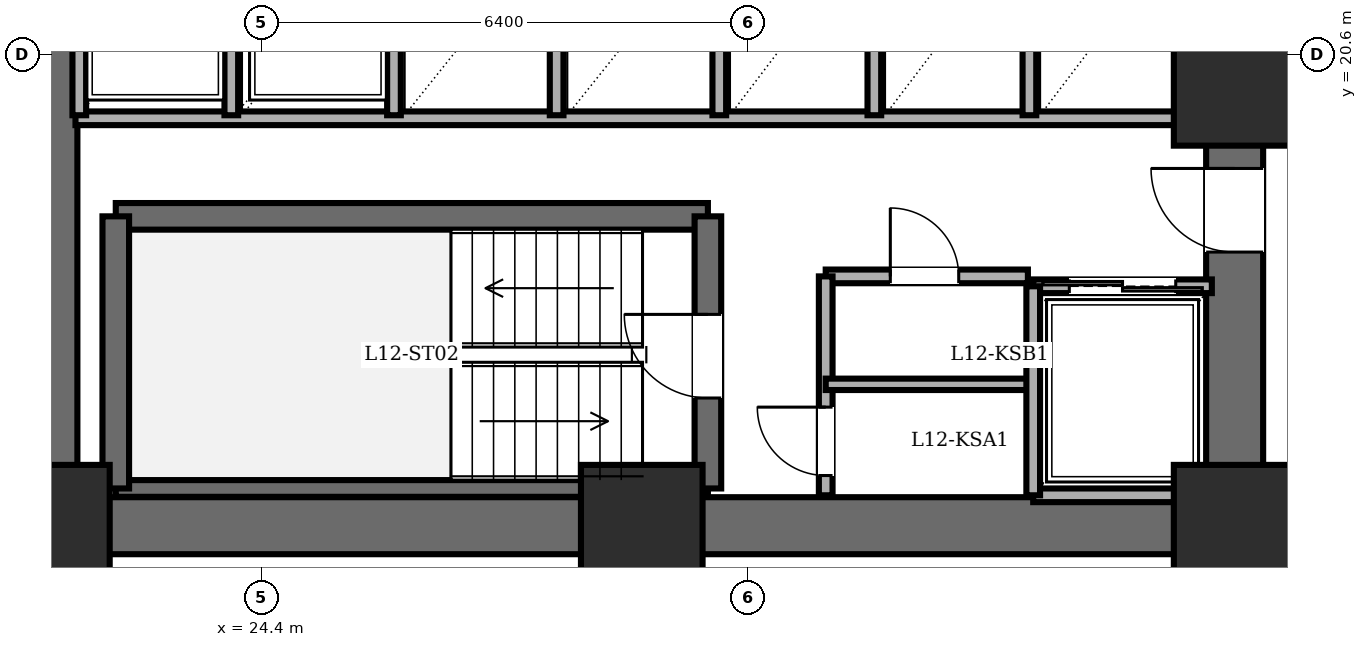
"""IFC4 building model, lengths in metres.
Left out: names, types, materials, properties, quantities, classifications, styles, units other than length and angle.
Written with IfcOpenShell. Run it as: python <this file> out.ifc"""

import sys

from ifc_helpers import new_model, si_unit, direction, frame, frame_2d, origin, origin_2d, place, context, subcontext, project, spatial, rectangle, extrude, element, fill, save


model = new_model("IFC4")
c1 = context("Model", 3, precision=1e-05, world=origin(), true_north=direction((0.0, 1.0)))
c2 = subcontext(c1, "Body", "Model", "MODEL_VIEW")
j1 = project(units=[si_unit("LENGTHUNIT", "METRE"), si_unit("PLANEANGLEUNIT", "RADIAN")], contexts=[c1])
p1 = place(None, origin())
s1 = spatial("IfcSite", under=j1, at=p1, CompositionType="ELEMENT")
p2 = place(p1, origin())
s2 = spatial("IfcBuilding", under=s1, at=p2, CompositionType="ELEMENT")
p3 = place(p2, frame((0.0, 0.0, 46.8)))
s3 = spatial("IfcBuildingStorey", under=s2, at=p3, CompositionType="ELEMENT", Elevation=46.8)
for number, where, z_axis, x_axis in (
    (1, (21.6, 14.4, 0.0), (0.0, 0.0, 1.0), (1.0, 0.0, 0.0)),
    (2, (29.4, 14.4, 0.0), (0.0, 0.0, 1.0), (1.0, 0.0, 0.0)),
    (3, (37.2, 14.4, 0.0), (0.0, 0.0, 1.0), (1.0, 0.0, 0.0)),
    (4, (37.2, 20.2, 0.0), (0.0, 0.0, 1.0), (1.0, 0.0, 0.0)),
):
    element("IfcColumn", number, at=place(p3, frame(where, z_axis=z_axis, x_axis=x_axis)), inside=s3, PredefinedType="COLUMN", context=c2, shape_type="SweptSolid", body=[
        extrude(rectangle(XDim=1.6, YDim=1.6, at=origin_2d()), origin(), (0.0, 0.0, 1.0), 3.6),
    ])
p4 = place(p3, frame((21.6, 14.4, 0.0), z_axis=(0.0, 0.0, 1.0), x_axis=(0.0, 1.0, 0.0)))
e5 = element("IfcWall", 5, at=p4, inside=s3, PredefinedType="SHEAR", context=c2, shape_type="SweptSolid", body=[
    extrude(rectangle(XDim=19.2, YDim=0.75, at=frame_2d((9.6, 0.0))), origin(), (0.0, 0.0, 1.0), 3.4),
])
p5 = place(p3, frame((37.2, 14.4, 0.0), z_axis=(0.0, 0.0, 1.0), x_axis=(-1.0, 0.0, 0.0)))
e6 = element("IfcWall", 6, at=p5, inside=s3, PredefinedType="SHEAR", context=c2, shape_type="SweptSolid", body=[
    extrude(rectangle(XDim=15.6, YDim=0.75, at=frame_2d((7.8, 0.0))), origin(), (0.0, 0.0, 1.0), 3.4),
])
p6 = place(p3, frame((37.2, 14.4, 0.0), z_axis=(0.0, 0.0, 1.0), x_axis=(0.0, 1.0, 0.0)))
e7 = element("IfcWall", 7, at=p6, inside=s3, PredefinedType="SHEAR", context=c2, shape_type="SweptSolid", body=[
    extrude(rectangle(XDim=19.2, YDim=0.75, at=frame_2d((9.6, 0.0))), origin(), (0.0, 0.0, 1.0), 3.4),
])
p7 = place(p6, frame((15.8, 0.0, 0.0)))
e8 = element("IfcOpeningElement", 8, at=p7, cuts=e7, PredefinedType="OPENING", context=c2, shape_type="SweptSolid", body=[
    extrude(rectangle(XDim=1.15, YDim=2.15, at=frame_2d((0.575, 1.075))), frame((0.0, 0.385, 0.0), z_axis=(0.0, -1.0, 0.0), x_axis=(1.0, 0.0, 0.0)), (0.0, 0.0, 1.0), 0.77),
])
p8 = place(p6, frame((3.6, 0.0, 0.0)))
e9 = element("IfcOpeningElement", 9, at=p8, cuts=e7, PredefinedType="OPENING", context=c2, shape_type="SweptSolid", body=[
    extrude(rectangle(XDim=1.1, YDim=2.15, at=frame_2d((0.55, 1.075))), frame((0.0, 0.385, 0.0), z_axis=(0.0, -1.0, 0.0), x_axis=(1.0, 0.0, 0.0)), (0.0, 0.0, 1.0), 0.77),
])
p9 = place(p6, frame((8.6, 0.0, 0.0)))
e10 = element("IfcOpeningElement", 10, at=p9, cuts=e7, PredefinedType="OPENING", context=c2, shape_type="SweptSolid", body=[
    extrude(rectangle(XDim=1.3, YDim=2.2, at=frame_2d((0.65, 1.1))), frame((0.0, 0.385, 0.0), z_axis=(0.0, -1.0, 0.0), x_axis=(1.0, 0.0, 0.0)), (0.0, 0.0, 1.0), 0.77),
])
p10 = place(p3, frame((22.48, 18.47, 0.0), z_axis=(0.0, 0.0, 1.0), x_axis=(1.0, 0.0, 0.0)))
e11 = element("IfcWall", 11, at=p10, inside=s3, PredefinedType="SOLIDWALL", context=c2, shape_type="SweptSolid", body=[
    extrude(rectangle(XDim=7.79, YDim=0.35, at=frame_2d((3.895, 0.0))), origin(), (0.0, 0.0, 1.0), 3.4),
])
p11 = place(p3, frame((22.48, 14.89, 0.0), z_axis=(0.0, 0.0, 1.0), x_axis=(1.0, 0.0, 0.0)))
e12 = element("IfcWall", 12, at=p11, inside=s3, PredefinedType="PARTITIONING", context=c2, shape_type="SweptSolid", body=[
    extrude(rectangle(XDim=7.79, YDim=0.22, at=frame_2d((3.895, 0.0))), origin(), (0.0, 0.0, 1.0), 3.4),
])
p12 = place(p3, frame((22.48, 14.89, 0.0), z_axis=(0.0, 0.0, 1.0), x_axis=(0.0, 1.0, 0.0)))
e13 = element("IfcWall", 13, at=p12, inside=s3, PredefinedType="SOLIDWALL", context=c2, shape_type="SweptSolid", body=[
    extrude(rectangle(XDim=3.58, YDim=0.35, at=frame_2d((1.79, 0.0))), origin(), (0.0, 0.0, 1.0), 3.4),
])
p13 = place(p3, frame((30.27, 14.89, 0.0), z_axis=(0.0, 0.0, 1.0), x_axis=(0.0, 1.0, 0.0)))
e14 = element("IfcWall", 14, at=p13, inside=s3, PredefinedType="SOLIDWALL", context=c2, shape_type="SweptSolid", body=[
    extrude(rectangle(XDim=3.58, YDim=0.35, at=frame_2d((1.79, 0.0))), origin(), (0.0, 0.0, 1.0), 3.4),
])
p14 = place(p13, frame((1.19, 0.0, 0.0)))
e15 = element("IfcOpeningElement", 15, at=p14, cuts=e14, PredefinedType="OPENING", context=c2, shape_type="SweptSolid", body=[
    extrude(rectangle(XDim=1.1, YDim=2.15, at=frame_2d((0.55, 1.075))), frame((0.0, 0.185, 0.0), z_axis=(0.0, -1.0, 0.0), x_axis=(1.0, 0.0, 0.0)), (0.0, 0.0, 1.0), 0.37),
])
p15 = place(p3, frame((21.95, 19.76, 0.0), z_axis=(0.0, 0.0, 1.0), x_axis=(1.0, 0.0, 0.0)))
e16 = element("IfcWall", 16, at=p15, inside=s3, PredefinedType="PARTITIONING", context=c2, shape_type="SweptSolid", body=[
    extrude(rectangle(XDim=14.87, YDim=0.18, at=frame_2d((7.435, 0.0))), origin(), (0.0, 0.0, 1.0), 3.4),
])
p16 = place(p3, frame((31.82, 17.68, 0.0), z_axis=(0.0, 0.0, 1.0), x_axis=(1.0, 0.0, 0.0)))
e17 = element("IfcWall", 17, at=p16, inside=s3, PredefinedType="PARTITIONING", context=c2, shape_type="SweptSolid", body=[
    extrude(rectangle(XDim=2.66, YDim=0.18, at=frame_2d((1.33, 0.0))), origin(), (0.0, 0.0, 1.0), 3.4),
])
p17 = place(p16, frame((0.85, 0.0, 0.0)))
e18 = element("IfcOpeningElement", 18, at=p17, cuts=e17, PredefinedType="OPENING", context=c2, shape_type="SweptSolid", body=[
    extrude(rectangle(XDim=0.9, YDim=2.05, at=frame_2d((0.45, 1.025))), frame((0.0, 0.1, 0.0), z_axis=(0.0, -1.0, 0.0), x_axis=(1.0, 0.0, 0.0)), (0.0, 0.0, 1.0), 0.2),
])
p18 = place(p3, frame((31.82, 14.8, 0.0), z_axis=(0.0, 0.0, 1.0), x_axis=(0.0, 1.0, 0.0)))
e19 = element("IfcWall", 19, at=p18, inside=s3, PredefinedType="PARTITIONING", context=c2, shape_type="SweptSolid", body=[
    extrude(rectangle(XDim=2.88, YDim=0.18, at=frame_2d((1.44, 0.0))), origin(), (0.0, 0.0, 1.0), 3.4),
])
p19 = place(p18, frame((0.26, 0.0, 0.0)))
e20 = element("IfcOpeningElement", 20, at=p19, cuts=e19, PredefinedType="OPENING", context=c2, shape_type="SweptSolid", body=[
    extrude(rectangle(XDim=0.9, YDim=2.05, at=frame_2d((0.45, 1.025))), frame((0.0, 0.1, 0.0), z_axis=(0.0, -1.0, 0.0), x_axis=(1.0, 0.0, 0.0)), (0.0, 0.0, 1.0), 0.2),
])
p20 = place(p3, frame((31.82, 16.26, 0.0), z_axis=(0.0, 0.0, 1.0), x_axis=(1.0, 0.0, 0.0)))
e21 = element("IfcWall", 21, at=p20, inside=s3, PredefinedType="PARTITIONING", context=c2, shape_type="SweptSolid", body=[
    extrude(rectangle(XDim=2.66, YDim=0.15, at=frame_2d((1.33, 0.0))), origin(), (0.0, 0.0, 1.0), 3.4),
])
p21 = place(p3, frame((34.55, 17.55, 0.0), z_axis=(0.0, 0.0, 1.0), x_axis=(1.0, 0.0, 0.0)))
e22 = element("IfcWall", 22, at=p21, inside=s3, PredefinedType="PARTITIONING", context=c2, shape_type="SweptSolid", body=[
    extrude(rectangle(XDim=2.35, YDim=0.18, at=frame_2d((1.175, 0.0))), origin(), (0.0, 0.0, 1.0), 3.4),
])
p22 = place(p21, frame((0.475, 0.0, 0.0)))
e23 = element("IfcOpeningElement", 23, at=p22, cuts=e22, PredefinedType="OPENING", context=c2, shape_type="SweptSolid", body=[
    extrude(rectangle(XDim=1.4, YDim=2.3, at=frame_2d((0.7, 1.15))), frame((0.0, 0.1, 0.0), z_axis=(0.0, -1.0, 0.0), x_axis=(1.0, 0.0, 0.0)), (0.0, 0.0, 1.0), 0.2),
])
p23 = place(p3, frame((36.9, 14.8, 0.0), z_axis=(0.0, 0.0, 1.0), x_axis=(-1.0, 0.0, 0.0)))
e24 = element("IfcWall", 24, at=p23, inside=s3, PredefinedType="PARTITIONING", context=c2, shape_type="SweptSolid", body=[
    extrude(rectangle(XDim=2.35, YDim=0.18, at=frame_2d((1.175, 0.0))), origin(), (0.0, 0.0, 1.0), 3.4),
])
p24 = place(p3, frame((34.55, 17.55, 0.0), z_axis=(0.0, 0.0, 1.0), x_axis=(0.0, -1.0, 0.0)))
e25 = element("IfcWall", 25, at=p24, inside=s3, PredefinedType="PARTITIONING", context=c2, shape_type="SweptSolid", body=[
    extrude(rectangle(XDim=2.75, YDim=0.18, at=frame_2d((1.375, 0.0))), origin(), (0.0, 0.0, 1.0), 3.4),
])
for number, where, z_axis, x_axis in (
    (26, (24.0, 19.8, 0.0), (0.0, 0.0, 1.0), (0.0, 1.0, 0.0)),
    (27, (22.0, 22.3, 0.0), (0.0, 0.0, 1.0), (0.0, -1.0, 0.0)),
    (28, (26.14, 19.8, 0.0), (0.0, 0.0, 1.0), (0.0, 1.0, 0.0)),
    (29, (28.28, 19.8, 0.0), (0.0, 0.0, 1.0), (0.0, 1.0, 0.0)),
    (30, (30.42, 19.8, 0.0), (0.0, 0.0, 1.0), (0.0, 1.0, 0.0)),
    (31, (32.46, 19.8, 0.0), (0.0, 0.0, 1.0), (0.0, 1.0, 0.0)),
    (32, (34.5, 19.8, 0.0), (0.0, 0.0, 1.0), (0.0, 1.0, 0.0)),
    (33, (36.54, 19.8, 0.0), (0.0, 0.0, 1.0), (0.0, 1.0, 0.0)),
):
    element("IfcWall", number, at=place(p3, frame(where, z_axis=z_axis, x_axis=x_axis)), inside=s3, PredefinedType="PARTITIONING", context=c2, shape_type="SweptSolid", body=[
        extrude(rectangle(XDim=2.5, YDim=0.18, at=frame_2d((1.25, 0.0))), origin(), (0.0, 0.0, 1.0), 3.4),
    ])
p25 = place(p14, origin())
e34 = element("IfcDoor", 34, at=p25, inside=s3, OperationType="SINGLE_SWING_RIGHT", PredefinedType="DOOR", context=c2, shape_type="SweptSolid", body=[
    extrude(rectangle(XDim=1.1, YDim=2.15, at=frame_2d((0.55, 1.075))), frame((0.0, 0.025, 0.0), z_axis=(0.0, -1.0, 0.0), x_axis=(1.0, 0.0, 0.0)), (0.0, 0.0, 1.0), 0.05),
])
fill(e15, e34)
p26 = place(p8, origin())
e35 = element("IfcDoor", 35, at=p26, inside=s3, OperationType="SINGLE_SWING_RIGHT", PredefinedType="DOOR", context=c2, shape_type="SweptSolid", body=[
    extrude(rectangle(XDim=1.1, YDim=2.15, at=frame_2d((0.55, 1.075))), frame((0.0, 0.025, 0.0), z_axis=(0.0, -1.0, 0.0), x_axis=(1.0, 0.0, 0.0)), (0.0, 0.0, 1.0), 0.05),
])
fill(e9, e35)
p27 = place(p17, origin())
e36 = element("IfcDoor", 36, at=p27, inside=s3, OperationType="SINGLE_SWING_LEFT", PredefinedType="DOOR", context=c2, shape_type="SweptSolid", body=[
    extrude(rectangle(XDim=0.9, YDim=2.05, at=frame_2d((0.45, 1.025))), frame((0.0, 0.025, 0.0), z_axis=(0.0, -1.0, 0.0), x_axis=(1.0, 0.0, 0.0)), (0.0, 0.0, 1.0), 0.05),
])
fill(e18, e36)
p28 = place(p19, origin())
e37 = element("IfcDoor", 37, at=p28, inside=s3, OperationType="SINGLE_SWING_RIGHT", PredefinedType="DOOR", context=c2, shape_type="SweptSolid", body=[
    extrude(rectangle(XDim=0.9, YDim=2.05, at=frame_2d((0.45, 1.025))), frame((0.0, 0.025, 0.0), z_axis=(0.0, -1.0, 0.0), x_axis=(1.0, 0.0, 0.0)), (0.0, 0.0, 1.0), 0.05),
])
fill(e20, e37)
p29 = place(p22, origin())
e38 = element("IfcDoor", 38, at=p29, inside=s3, OperationType="DOUBLE_DOOR_SLIDING", PredefinedType="DOOR", context=c2, shape_type="SweptSolid", body=[
    extrude(rectangle(XDim=1.4, YDim=2.3, at=frame_2d((0.7, 1.15))), frame((0.0, 0.025, 0.0), z_axis=(0.0, -1.0, 0.0), x_axis=(1.0, 0.0, 0.0)), (0.0, 0.0, 1.0), 0.05),
])
fill(e23, e38)
save(model, sys.argv[1])
